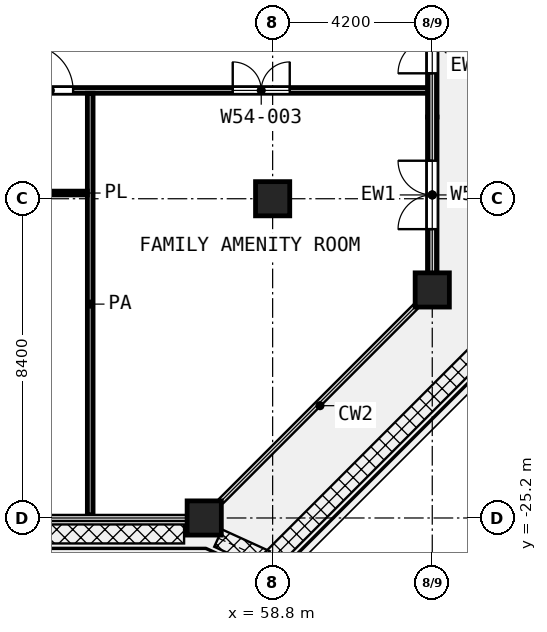
"""IFC4 building model, lengths in metres.
Left out: names, types, materials, properties, quantities, classifications, styles, units other than length and angle.
Written with IfcOpenShell. Run it as: python <this file> out.ifc"""

import sys

from ifc_helpers import new_model, si_unit, direction, frame, frame_2d, origin, origin_2d, place, context, subcontext, project, spatial, rectangle, extrude, element, fill, save


model = new_model("IFC4")
c1 = context("Model", 3, precision=1e-05, world=origin(), true_north=direction((0.0, 1.0)))
c2 = subcontext(c1, "Body", "Model", "MODEL_VIEW")
j1 = project(units=[si_unit("LENGTHUNIT", "METRE"), si_unit("PLANEANGLEUNIT", "RADIAN")], contexts=[c1])
p1 = place(None, origin())
s1 = spatial("IfcSite", under=j1, at=p1, CompositionType="ELEMENT")
p2 = place(p1, origin())
s2 = spatial("IfcBuilding", under=s1, at=p2, CompositionType="ELEMENT")
p3 = place(p2, frame((0.0, 0.0, 255.8)))
s3 = spatial("IfcBuildingStorey", under=s2, at=p3, CompositionType="ELEMENT", Elevation=255.8)
for number, where, z_axis, x_axis in (
    (1, (58.8, -16.8, 0.0), (0.0, 0.0, 1.0), (1.0, 0.0, 0.0)),
    (2, (63.0, -19.2, 0.0), (0.0, 0.0, 1.0), (1.0, 0.0, 0.0)),
    (3, (57.0, -25.2, 0.0), (0.0, 0.0, 1.0), (1.0, 0.0, 0.0)),
):
    element("IfcColumn", number, at=place(p3, frame(where, z_axis=z_axis, x_axis=x_axis)), inside=s3, PredefinedType="COLUMN", context=c2, shape_type="SweptSolid", body=[
        extrude(rectangle(XDim=0.9, YDim=0.9, at=origin_2d()), origin(), (0.0, 0.0, 1.0), 4.2),
    ])
p4 = place(p3, frame((63.0, -18.75, 0.0), z_axis=(0.0, 0.0, 1.0), x_axis=(0.0, 1.0, 0.0)))
e4 = element("IfcWall", 4, at=p4, inside=s3, PredefinedType="SOLIDWALL", context=c2, shape_type="SweptSolid", body=[
    extrude(rectangle(XDim=4.1, YDim=0.25, at=frame_2d((2.05, 0.0))), origin(), (0.0, 0.0, 1.0), 2.58),
])
p5 = place(p4, frame((1.15, 0.0, 0.0)))
e5 = element("IfcOpeningElement", 5, at=p5, cuts=e4, PredefinedType="OPENING", context=c2, shape_type="SweptSolid", body=[
    extrude(rectangle(XDim=1.8, YDim=2.1, at=frame_2d((0.9, 1.05))), frame((0.0, 0.135, 0.0), z_axis=(0.0, -1.0, 0.0), x_axis=(1.0, 0.0, 0.0)), (0.0, 0.0, 1.0), 0.27),
])
p6 = place(p3, frame((63.0, -14.65, 0.0), z_axis=(0.0, 0.0, 1.0), x_axis=(0.0, 1.0, 0.0)))
e6 = element("IfcWall", 6, at=p6, inside=s3, PredefinedType="SOLIDWALL", context=c2, shape_type="SweptSolid", body=[
    extrude(rectangle(XDim=4.1, YDim=0.25, at=frame_2d((2.05, 0.0))), origin(), (0.0, 0.0, 1.0), 2.58),
])
p7 = place(p6, frame((1.15, 0.0, 0.0)))
e7 = element("IfcOpeningElement", 7, at=p7, cuts=e6, PredefinedType="OPENING", context=c2, shape_type="SweptSolid", body=[
    extrude(rectangle(XDim=1.8, YDim=2.1, at=frame_2d((0.9, 1.05))), frame((0.0, 0.135, 0.0), z_axis=(0.0, -1.0, 0.0), x_axis=(1.0, 0.0, 0.0)), (0.0, 0.0, 1.0), 0.27),
])
p8 = place(p3, frame((51.95, -16.65, 0.0), z_axis=(0.0, 0.0, 1.0), x_axis=(1.0, 0.0, 0.0)))
e8 = element("IfcWall", 8, at=p8, inside=s3, PredefinedType="PARTITIONING", context=c2, shape_type="SweptSolid", body=[
    extrude(rectangle(XDim=1.975, YDim=0.1, at=frame_2d((0.988, 0.0))), origin(), (0.0, 0.0, 1.0), 3.6),
])
p9 = place(p3, frame((29.4, -13.95, 0.0), z_axis=(0.0, 0.0, 1.0), x_axis=(1.0, 0.0, 0.0)))
e9 = element("IfcWall", 9, at=p9, inside=s3, PredefinedType="PARTITIONING", context=c2, shape_type="SweptSolid", body=[
    extrude(rectangle(XDim=33.52, YDim=0.15, at=frame_2d((16.76, 0.0))), origin(), (0.0, 0.0, 1.0), 2.7),
])
p10 = place(p9, frame((3.45, 0.0, 0.0)))
e10 = element("IfcOpeningElement", 10, at=p10, cuts=e9, PredefinedType="OPENING", context=c2, shape_type="SweptSolid", body=[
    extrude(rectangle(XDim=1.2, YDim=2.1, at=frame_2d((0.6, 1.05))), frame((0.0, 0.085, 0.0), z_axis=(0.0, -1.0, 0.0), x_axis=(1.0, 0.0, 0.0)), (0.0, 0.0, 1.0), 0.17),
])
p11 = place(p9, frame((11.2, 0.0, 0.0)))
e11 = element("IfcOpeningElement", 11, at=p11, cuts=e9, PredefinedType="OPENING", context=c2, shape_type="SweptSolid", body=[
    extrude(rectangle(XDim=1.2, YDim=2.1, at=frame_2d((0.6, 1.05))), frame((0.0, 0.085, 0.0), z_axis=(0.0, -1.0, 0.0), x_axis=(1.0, 0.0, 0.0)), (0.0, 0.0, 1.0), 0.17),
])
p12 = place(p9, frame((13.6, 0.0, 0.0)))
e12 = element("IfcOpeningElement", 12, at=p12, cuts=e9, PredefinedType="OPENING", context=c2, shape_type="SweptSolid", body=[
    extrude(rectangle(XDim=1.2, YDim=2.1, at=frame_2d((0.6, 1.05))), frame((0.0, 0.085, 0.0), z_axis=(0.0, -1.0, 0.0), x_axis=(1.0, 0.0, 0.0)), (0.0, 0.0, 1.0), 0.17),
])
p13 = place(p9, frame((21.075, 0.0, 0.0)))
e13 = element("IfcOpeningElement", 13, at=p13, cuts=e9, PredefinedType="OPENING", context=c2, shape_type="SweptSolid", body=[
    extrude(rectangle(XDim=1.2, YDim=2.1, at=frame_2d((0.6, 1.05))), frame((0.0, 0.085, 0.0), z_axis=(0.0, -1.0, 0.0), x_axis=(1.0, 0.0, 0.0)), (0.0, 0.0, 1.0), 0.17),
])
p14 = place(p9, frame((19.55, 0.0, 0.0)))
e14 = element("IfcOpeningElement", 14, at=p14, cuts=e9, PredefinedType="OPENING", context=c2, shape_type="SweptSolid", body=[
    extrude(rectangle(XDim=1.2, YDim=2.1, at=frame_2d((0.6, 1.05))), frame((0.0, 0.085, 0.0), z_axis=(0.0, -1.0, 0.0), x_axis=(1.0, 0.0, 0.0)), (0.0, 0.0, 1.0), 0.17),
])
p15 = place(p9, frame((22.95, 0.0, 0.0)))
e15 = element("IfcOpeningElement", 15, at=p15, cuts=e9, PredefinedType="OPENING", context=c2, shape_type="SweptSolid", body=[
    extrude(rectangle(XDim=1.2, YDim=2.1, at=frame_2d((0.6, 1.05))), frame((0.0, 0.085, 0.0), z_axis=(0.0, -1.0, 0.0), x_axis=(1.0, 0.0, 0.0)), (0.0, 0.0, 1.0), 0.17),
])
p16 = place(p9, frame((28.35, 0.0, 0.0)))
e16 = element("IfcOpeningElement", 16, at=p16, cuts=e9, PredefinedType="OPENING", context=c2, shape_type="SweptSolid", body=[
    extrude(rectangle(XDim=1.5, YDim=2.1, at=frame_2d((0.75, 1.05))), frame((0.0, 0.085, 0.0), z_axis=(0.0, -1.0, 0.0), x_axis=(1.0, 0.0, 0.0)), (0.0, 0.0, 1.0), 0.17),
])
p17 = place(p3, frame((54.0, -25.12, 0.0), z_axis=(0.0, 0.0, 1.0), x_axis=(0.0, 1.0, 0.0)))
e17 = element("IfcWall", 17, at=p17, inside=s3, PredefinedType="PARTITIONING", context=c2, shape_type="SweptSolid", body=[
    extrude(rectangle(XDim=11.095, YDim=0.15, at=frame_2d((5.548, 0.0))), origin(), (0.0, 0.0, 1.0), 3.6),
])
p18 = place(p5, origin())
e18 = element("IfcDoor", 18, at=p18, inside=s3, OperationType="DOUBLE_DOOR_SINGLE_SWING", PredefinedType="DOOR", context=c2, shape_type="SweptSolid", body=[
    extrude(rectangle(XDim=1.8, YDim=2.1, at=frame_2d((0.9, 1.05))), frame((0.0, 0.025, 0.0), z_axis=(0.0, -1.0, 0.0), x_axis=(1.0, 0.0, 0.0)), (0.0, 0.0, 1.0), 0.05),
])
fill(e5, e18)
p19 = place(p7, origin())
e19 = element("IfcDoor", 19, at=p19, inside=s3, OperationType="DOUBLE_DOOR_SINGLE_SWING", PredefinedType="DOOR", context=c2, shape_type="SweptSolid", body=[
    extrude(rectangle(XDim=1.8, YDim=2.1, at=frame_2d((0.9, 1.05))), frame((0.0, 0.025, 0.0), z_axis=(0.0, -1.0, 0.0), x_axis=(1.0, 0.0, 0.0)), (0.0, 0.0, 1.0), 0.05),
])
fill(e7, e19)
p20 = place(p15, origin())
e20 = element("IfcDoor", 20, at=p20, inside=s3, OperationType="SINGLE_SWING_LEFT", PredefinedType="DOOR", context=c2, shape_type="SweptSolid", body=[
    extrude(rectangle(XDim=1.2, YDim=2.1, at=frame_2d((0.6, 1.05))), frame((0.0, 0.025, 0.0), z_axis=(0.0, -1.0, 0.0), x_axis=(1.0, 0.0, 0.0)), (0.0, 0.0, 1.0), 0.05),
])
fill(e15, e20)
p21 = place(p16, origin())
e21 = element("IfcDoor", 21, at=p21, inside=s3, OperationType="DOUBLE_DOOR_SINGLE_SWING", PredefinedType="DOOR", context=c2, shape_type="SweptSolid", body=[
    extrude(rectangle(XDim=1.5, YDim=2.1, at=frame_2d((0.75, 1.05))), frame((0.0, 0.025, 0.0), z_axis=(0.0, -1.0, 0.0), x_axis=(1.0, 0.0, 0.0)), (0.0, 0.0, 1.0), 0.05),
])
fill(e16, e21)
save(model, sys.argv[1])
